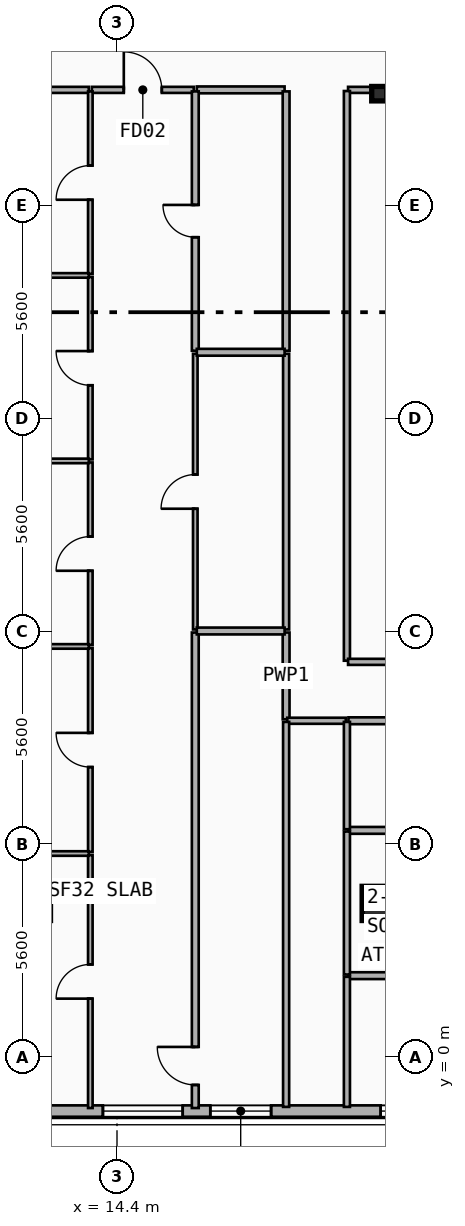
"""IFC4 building model, lengths in metres.
Left out: names, types, materials, properties, quantities, classifications, styles, units other than length and angle.
Written with IfcOpenShell. Run it as: python <this file> out.ifc"""

import sys

from ifc_helpers import new_model, si_unit, direction, frame, frame_2d, origin, origin_2d, place, context, subcontext, project, spatial, rectangle, i_section, extrude, element, fill, save


model = new_model("IFC4")
c1 = context("Model", 3, precision=1e-05, world=origin(), true_north=direction((0.0, 1.0)))
c2 = subcontext(c1, "Body", "Model", "MODEL_VIEW")
j1 = project(units=[si_unit("LENGTHUNIT", "METRE"), si_unit("PLANEANGLEUNIT", "RADIAN")], contexts=[c1])
p1 = place(None, origin())
s1 = spatial("IfcSite", under=j1, at=p1, CompositionType="ELEMENT")
p2 = place(p1, origin())
s2 = spatial("IfcBuilding", under=s1, at=p2, CompositionType="ELEMENT")
p3 = place(p2, frame((0.0, 0.0, 243.6)))
s3 = spatial("IfcBuildingStorey", under=s2, at=p3, CompositionType="ELEMENT", Elevation=243.6)
p4 = place(p3, frame((21.3, 25.35, 0.0), z_axis=(0.0, 0.0, 1.0), x_axis=(1.0, 0.0, 0.0)))
e1 = element("IfcColumn", 1, at=p4, inside=s3, PredefinedType="COLUMN", context=c2, shape_type="SweptSolid", body=[
    extrude(i_section(OverallWidth=0.395, OverallDepth=0.38, WebThickness=0.019, FlangeThickness=0.03, FilletRadius=0.015, at=origin_2d()), origin(), (0.0, 0.0, 1.0), 3.7),
])
p5 = place(p3, frame((21.3, 4.153, 0.0), z_axis=(0.0, -0.090227632116, 0.995921168769), x_axis=(1.0, 0.0, 0.0)))
e2 = element("IfcColumn", 2, at=p5, inside=s3, PredefinedType="COLUMN", context=c2, shape_type="SweptSolid", body=[
    extrude(rectangle(XDim=0.9, YDim=0.9, at=origin_2d()), origin(), (0.0, 0.0, 1.0), 3.715),
])
p6 = place(p3, frame((45.2, -1.42, 0.0), z_axis=(0.0, 0.0, 1.0), x_axis=(-1.0, 0.0, 0.0)))
e3 = element("IfcWall", 3, at=p6, inside=s3, PredefinedType="SOLIDWALL", context=c2, shape_type="SweptSolid", body=[
    extrude(rectangle(XDim=32.8, YDim=0.3, at=frame_2d((16.4, 0.0))), origin(), (0.0, 0.0, 1.0), 3.42),
])
p7 = place(p6, frame((29.071, 0.0, 0.75)))
e4 = element("IfcOpeningElement", 4, at=p7, cuts=e3, PredefinedType="OPENING", context=c2, shape_type="SweptSolid", body=[
    extrude(rectangle(XDim=2.1, YDim=2.1, at=frame_2d((1.05, 1.05))), frame((0.0, 0.16, 0.0), z_axis=(0.0, -1.0, 0.0), x_axis=(1.0, 0.0, 0.0)), (0.0, 0.0, 1.0), 0.32),
])
p8 = place(p6, frame((26.745, 0.0, 0.75)))
e5 = element("IfcOpeningElement", 5, at=p8, cuts=e3, PredefinedType="OPENING", context=c2, shape_type="SweptSolid", body=[
    extrude(rectangle(XDim=1.6, YDim=1.95, at=frame_2d((0.8, 0.975))), frame((0.0, 0.16, 0.0), z_axis=(0.0, -1.0, 0.0), x_axis=(1.0, 0.0, 0.0)), (0.0, 0.0, 1.0), 0.32),
])
p9 = place(p6, frame((18.105, 0.0, 0.75)))
e6 = element("IfcOpeningElement", 6, at=p9, cuts=e3, PredefinedType="OPENING", context=c2, shape_type="SweptSolid", body=[
    extrude(rectangle(XDim=2.1, YDim=2.1, at=frame_2d((1.05, 1.05))), frame((0.0, 0.16, 0.0), z_axis=(0.0, -1.0, 0.0), x_axis=(1.0, 0.0, 0.0)), (0.0, 0.0, 1.0), 0.32),
])
p10 = place(p6, frame((21.762, 0.0, 0.75)))
e7 = element("IfcOpeningElement", 7, at=p10, cuts=e3, PredefinedType="OPENING", context=c2, shape_type="SweptSolid", body=[
    extrude(rectangle(XDim=2.1, YDim=2.1, at=frame_2d((1.05, 1.05))), frame((0.0, 0.16, 0.0), z_axis=(0.0, -1.0, 0.0), x_axis=(1.0, 0.0, 0.0)), (0.0, 0.0, 1.0), 0.32),
])
p11 = place(p6, frame((11.364, 0.0, 0.75)))
e8 = element("IfcOpeningElement", 8, at=p11, cuts=e3, PredefinedType="OPENING", context=c2, shape_type="SweptSolid", body=[
    extrude(rectangle(XDim=2.1, YDim=2.1, at=frame_2d((1.05, 1.05))), frame((0.0, 0.16, 0.0), z_axis=(0.0, -1.0, 0.0), x_axis=(1.0, 0.0, 0.0)), (0.0, 0.0, 1.0), 0.32),
])
p12 = place(p6, frame((9.238, 0.0, 0.68)))
e9 = element("IfcOpeningElement", 9, at=p12, cuts=e3, PredefinedType="OPENING", context=c2, shape_type="SweptSolid", body=[
    extrude(rectangle(XDim=1.2, YDim=1.5, at=frame_2d((0.6, 0.75))), frame((0.0, 0.16, 0.0), z_axis=(0.0, -1.0, 0.0), x_axis=(1.0, 0.0, 0.0)), (0.0, 0.0, 1.0), 0.32),
])
p13 = place(p6, frame((14.669, 0.0, 0.75)))
e10 = element("IfcOpeningElement", 10, at=p13, cuts=e3, PredefinedType="OPENING", context=c2, shape_type="SweptSolid", body=[
    extrude(rectangle(XDim=2.1, YDim=2.1, at=frame_2d((1.05, 1.05))), frame((0.0, 0.16, 0.0), z_axis=(0.0, -1.0, 0.0), x_axis=(1.0, 0.0, 0.0)), (0.0, 0.0, 1.0), 0.32),
])
p14 = place(p6, frame((1.937, 0.0, 0.75)))
e11 = element("IfcOpeningElement", 11, at=p14, cuts=e3, PredefinedType="OPENING", context=c2, shape_type="SweptSolid", body=[
    extrude(rectangle(XDim=2.1, YDim=2.1, at=frame_2d((1.05, 1.05))), frame((0.0, 0.16, 0.0), z_axis=(0.0, -1.0, 0.0), x_axis=(1.0, 0.0, 0.0)), (0.0, 0.0, 1.0), 0.32),
])
p15 = place(p6, frame((4.709, 0.0, 0.8)))
e12 = element("IfcOpeningElement", 12, at=p15, cuts=e3, PredefinedType="OPENING", context=c2, shape_type="SweptSolid", body=[
    extrude(rectangle(XDim=1.8, YDim=1.8, at=frame_2d((0.9, 0.9))), frame((0.0, 0.16, 0.0), z_axis=(0.0, -1.0, 0.0), x_axis=(1.0, 0.0, 0.0)), (0.0, 0.0, 1.0), 0.32),
])
p16 = place(p3, frame((13.738, 25.45, 0.0), z_axis=(0.0, 0.0, 1.0), x_axis=(1.0, 0.0, 0.0)))
e13 = element("IfcWall", 13, at=p16, inside=s3, PredefinedType="PARTITIONING", context=c2, shape_type="SweptSolid", body=[
    extrude(rectangle(XDim=2.682, YDim=0.16, at=frame_2d((1.341, 0.0))), origin(), (0.0, 0.0, 1.0), 3.42),
])
p17 = place(p16, frame((0.841, 0.0, 0.0)))
e14 = element("IfcOpeningElement", 14, at=p17, cuts=e13, PredefinedType="OPENING", context=c2, shape_type="SweptSolid", body=[
    extrude(rectangle(XDim=1.0, YDim=2.15, at=frame_2d((0.5, 1.075))), frame((0.0, 0.09, 0.0), z_axis=(0.0, -1.0, 0.0), x_axis=(1.0, 0.0, 0.0)), (0.0, 0.0, 1.0), 0.18),
])
p18 = place(p3, frame((16.5, 25.45, 0.0), z_axis=(0.0, 0.0, 1.0), x_axis=(1.0, 0.0, 0.0)))
e15 = element("IfcWall", 15, at=p18, inside=s3, PredefinedType="PLUMBINGWALL", context=c2, shape_type="SweptSolid", body=[
    extrude(rectangle(XDim=2.31, YDim=0.18, at=frame_2d((1.155, 0.0))), origin(), (0.0, 0.0, 1.0), 3.42),
])
p19 = place(p3, frame((8.46, 25.45, 0.0), z_axis=(0.0, 0.0, 1.0), x_axis=(1.0, 0.0, 0.0)))
e16 = element("IfcWall", 16, at=p19, inside=s3, PredefinedType="PARTITIONING", context=c2, shape_type="SweptSolid", body=[
    extrude(rectangle(XDim=5.198, YDim=0.16, at=frame_2d((2.599, 0.0))), origin(), (0.0, 0.0, 1.0), 2.7),
])
p20 = place(p3, frame((18.85, 8.89, 0.0), z_axis=(0.0, 0.0, 1.0), x_axis=(0.0, 1.0, 0.0)))
e17 = element("IfcWall", 17, at=p20, inside=s3, PredefinedType="PLUMBINGWALL", context=c2, shape_type="SweptSolid", body=[
    extrude(rectangle(XDim=2.282, YDim=0.18, at=frame_2d((1.141, 0.0))), origin(), (0.0, 0.0, 1.0), 2.9),
])
p21 = place(p3, frame((18.85, 11.252, 0.0), z_axis=(0.0, 0.0, 1.0), x_axis=(0.0, 1.0, 0.0)))
e18 = element("IfcWall", 18, at=p21, inside=s3, PredefinedType="PARTITIONING", context=c2, shape_type="SweptSolid", body=[
    extrude(rectangle(XDim=7.254, YDim=0.16, at=frame_2d((3.627, 0.0))), origin(), (0.0, 0.0, 1.0), 2.9),
])
p22 = place(p3, frame((18.85, 18.586, 0.0), z_axis=(0.0, 0.0, 1.0), x_axis=(0.0, 1.0, 0.0)))
e19 = element("IfcWall", 19, at=p22, inside=s3, PredefinedType="PLUMBINGWALL", context=c2, shape_type="SweptSolid", body=[
    extrude(rectangle(XDim=6.824, YDim=0.18, at=frame_2d((3.412, 0.0))), origin(), (0.0, 0.0, 1.0), 2.9),
])
p23 = place(p3, frame((20.49, 8.85, 0.0), z_axis=(0.0, 0.0, 1.0), x_axis=(1.0, 0.0, 0.0)))
e20 = element("IfcWall", 20, at=p23, inside=s3, PredefinedType="PLUMBINGWALL", context=c2, shape_type="SweptSolid", body=[
    extrude(rectangle(XDim=3.796, YDim=0.18, at=frame_2d((1.898, 0.0))), origin(), (0.0, 0.0, 1.0), 2.7),
])
p24 = place(p3, frame((16.46, -1.34, 0.0), z_axis=(0.0, 0.0, 1.0), x_axis=(0.0, 1.0, 0.0)))
e21 = element("IfcWall", 21, at=p24, inside=s3, PredefinedType="PLUMBINGWALL", context=c2, shape_type="SweptSolid", body=[
    extrude(rectangle(XDim=12.512, YDim=0.18, at=frame_2d((6.256, 0.0))), origin(), (0.0, 0.0, 1.0), 2.9),
])
p25 = place(p24, frame((0.608, 0.0, 0.0)))
e22 = element("IfcOpeningElement", 22, at=p25, cuts=e21, PredefinedType="OPENING", context=c2, shape_type="SweptSolid", body=[
    extrude(rectangle(XDim=1.0, YDim=2.15, at=frame_2d((0.5, 1.075))), frame((0.0, 0.1, 0.0), z_axis=(0.0, -1.0, 0.0), x_axis=(1.0, 0.0, 0.0)), (0.0, 0.0, 1.0), 0.2),
])
p26 = place(p3, frame((16.46, 11.252, 0.0), z_axis=(0.0, 0.0, 1.0), x_axis=(0.0, 1.0, 0.0)))
e23 = element("IfcWall", 23, at=p26, inside=s3, PredefinedType="PARTITIONING", context=c2, shape_type="SweptSolid", body=[
    extrude(rectangle(XDim=7.254, YDim=0.12, at=frame_2d((3.627, 0.0))), origin(), (0.0, 0.0, 1.0), 2.9),
])
p27 = place(p26, frame((3.177, 0.0, 0.0)))
e24 = element("IfcOpeningElement", 24, at=p27, cuts=e23, PredefinedType="OPENING", context=c2, shape_type="SweptSolid", body=[
    extrude(rectangle(XDim=0.9, YDim=2.1, at=frame_2d((0.45, 1.05))), frame((0.0, 0.07, 0.0), z_axis=(0.0, -1.0, 0.0), x_axis=(1.0, 0.0, 0.0)), (0.0, 0.0, 1.0), 0.14),
])
p28 = place(p3, frame((16.46, 18.586, 0.0), z_axis=(0.0, 0.0, 1.0), x_axis=(0.0, 1.0, 0.0)))
e25 = element("IfcWall", 25, at=p28, inside=s3, PredefinedType="PLUMBINGWALL", context=c2, shape_type="SweptSolid", body=[
    extrude(rectangle(XDim=6.824, YDim=0.18, at=frame_2d((3.412, 0.0))), origin(), (0.0, 0.0, 1.0), 2.9),
])
p29 = place(p28, frame((2.987, 0.0, 0.0)))
e26 = element("IfcOpeningElement", 26, at=p29, cuts=e25, PredefinedType="OPENING", context=c2, shape_type="SweptSolid", body=[
    extrude(rectangle(XDim=0.85, YDim=2.1, at=frame_2d((0.425, 1.05))), frame((0.0, 0.1, 0.0), z_axis=(0.0, -1.0, 0.0), x_axis=(1.0, 0.0, 0.0)), (0.0, 0.0, 1.0), 0.2),
])
p30 = place(p3, frame((13.698, -1.34, 0.0), z_axis=(0.0, 0.0, 1.0), x_axis=(0.0, 1.0, 0.0)))
e27 = element("IfcWall", 27, at=p30, inside=s3, PredefinedType="PARTITIONING", context=c2, shape_type="SweptSolid", body=[
    extrude(rectangle(XDim=6.657, YDim=0.12, at=frame_2d((3.329, 0.0))), origin(), (0.0, 0.0, 1.0), 3.08),
])
p31 = place(p30, frame((2.878, 0.0, 0.0)))
e28 = element("IfcOpeningElement", 28, at=p31, cuts=e27, PredefinedType="OPENING", context=c2, shape_type="SweptSolid", body=[
    extrude(rectangle(XDim=0.9, YDim=2.1, at=frame_2d((0.45, 1.05))), frame((0.0, 0.07, 0.0), z_axis=(0.0, -1.0, 0.0), x_axis=(1.0, 0.0, 0.0)), (0.0, 0.0, 1.0), 0.14),
])
p32 = place(p3, frame((13.698, 5.397, 0.0), z_axis=(0.0, 0.0, 1.0), x_axis=(0.0, 1.0, 0.0)))
e29 = element("IfcWall", 29, at=p32, inside=s3, PredefinedType="PARTITIONING", context=c2, shape_type="SweptSolid", body=[
    extrude(rectangle(XDim=5.369, YDim=0.12, at=frame_2d((2.685, 0.0))), origin(), (0.0, 0.0, 1.0), 3.05),
])
p33 = place(p32, frame((2.235, 0.0, 0.0)))
e30 = element("IfcOpeningElement", 30, at=p33, cuts=e29, PredefinedType="OPENING", context=c2, shape_type="SweptSolid", body=[
    extrude(rectangle(XDim=0.9, YDim=2.1, at=frame_2d((0.45, 1.05))), frame((0.0, 0.07, 0.0), z_axis=(0.0, -1.0, 0.0), x_axis=(1.0, 0.0, 0.0)), (0.0, 0.0, 1.0), 0.14),
])
p34 = place(p3, frame((13.698, 10.846, 0.0), z_axis=(0.0, 0.0, 1.0), x_axis=(0.0, 1.0, 0.0)))
e31 = element("IfcWall", 31, at=p34, inside=s3, PredefinedType="PARTITIONING", context=c2, shape_type="SweptSolid", body=[
    extrude(rectangle(XDim=4.801, YDim=0.12, at=frame_2d((2.4, 0.0))), origin(), (0.0, 0.0, 1.0), 2.9),
])
p35 = place(p34, frame((1.95, 0.0, 0.0)))
e32 = element("IfcOpeningElement", 32, at=p35, cuts=e31, PredefinedType="OPENING", context=c2, shape_type="SweptSolid", body=[
    extrude(rectangle(XDim=0.9, YDim=2.1, at=frame_2d((0.45, 1.05))), frame((0.0, 0.07, 0.0), z_axis=(0.0, -1.0, 0.0), x_axis=(1.0, 0.0, 0.0)), (0.0, 0.0, 1.0), 0.14),
])
p36 = place(p3, frame((13.698, 15.727, 0.0), z_axis=(0.0, 0.0, 1.0), x_axis=(0.0, 1.0, 0.0)))
e33 = element("IfcWall", 33, at=p36, inside=s3, PredefinedType="PARTITIONING", context=c2, shape_type="SweptSolid", body=[
    extrude(rectangle(XDim=4.801, YDim=0.12, at=frame_2d((2.4, 0.0))), origin(), (0.0, 0.0, 1.0), 2.9),
])
p37 = place(p36, frame((1.95, 0.0, 0.0)))
e34 = element("IfcOpeningElement", 34, at=p37, cuts=e33, PredefinedType="OPENING", context=c2, shape_type="SweptSolid", body=[
    extrude(rectangle(XDim=0.9, YDim=2.1, at=frame_2d((0.45, 1.05))), frame((0.0, 0.07, 0.0), z_axis=(0.0, -1.0, 0.0), x_axis=(1.0, 0.0, 0.0)), (0.0, 0.0, 1.0), 0.14),
])
p38 = place(p3, frame((13.698, 20.608, 0.0), z_axis=(0.0, 0.0, 1.0), x_axis=(0.0, 1.0, 0.0)))
e35 = element("IfcWall", 35, at=p38, inside=s3, PredefinedType="PARTITIONING", context=c2, shape_type="SweptSolid", body=[
    extrude(rectangle(XDim=4.802, YDim=0.12, at=frame_2d((2.401, 0.0))), origin(), (0.0, 0.0, 1.0), 3.05),
])
p39 = place(p38, frame((1.951, 0.0, 0.0)))
e36 = element("IfcOpeningElement", 36, at=p39, cuts=e35, PredefinedType="OPENING", context=c2, shape_type="SweptSolid", body=[
    extrude(rectangle(XDim=0.9, YDim=2.1, at=frame_2d((0.45, 1.05))), frame((0.0, 0.07, 0.0), z_axis=(0.0, -1.0, 0.0), x_axis=(1.0, 0.0, 0.0)), (0.0, 0.0, 1.0), 0.14),
])
p40 = place(p3, frame((16.5, 11.212, 0.0), z_axis=(0.0, 0.0, 1.0), x_axis=(1.0, 0.0, 0.0)))
e37 = element("IfcWall", 37, at=p40, inside=s3, PredefinedType="PLUMBINGWALL", context=c2, shape_type="SweptSolid", body=[
    extrude(rectangle(XDim=2.31, YDim=0.18, at=frame_2d((1.155, 0.0))), origin(), (0.0, 0.0, 1.0), 2.9),
])
p41 = place(p3, frame((16.5, 18.546, 0.0), z_axis=(0.0, 0.0, 1.0), x_axis=(1.0, 0.0, 0.0)))
e38 = element("IfcWall", 38, at=p41, inside=s3, PredefinedType="PLUMBINGWALL", context=c2, shape_type="SweptSolid", body=[
    extrude(rectangle(XDim=2.31, YDim=0.18, at=frame_2d((1.155, 0.0))), origin(), (0.0, 0.0, 1.0), 3.42),
])
for number, where, z_axis, x_axis in (
    (39, (8.46, 5.357, 0.0), (0.0, 0.0, 1.0), (1.0, 0.0, 0.0)),
    (40, (8.46, 10.806, 0.0), (0.0, 0.0, 1.0), (1.0, 0.0, 0.0)),
    (41, (8.46, 15.687, 0.0), (0.0, 0.0, 1.0), (1.0, 0.0, 0.0)),
    (42, (8.46, 20.568, 0.0), (0.0, 0.0, 1.0), (1.0, 0.0, 0.0)),
):
    element("IfcWall", number, at=place(p3, frame(where, z_axis=z_axis, x_axis=x_axis)), inside=s3, PredefinedType="PARTITIONING", context=c2, shape_type="SweptSolid", body=[
        extrude(rectangle(XDim=5.198, YDim=0.12, at=frame_2d((2.599, 0.0))), origin(), (0.0, 0.0, 1.0), 2.7),
    ])
p42 = place(p3, frame((20.49, 2.143, 0.0), z_axis=(0.0, 0.0, 1.0), x_axis=(1.0, 0.0, 0.0)))
e43 = element("IfcWall", 43, at=p42, inside=s3, PredefinedType="PLUMBINGWALL", context=c2, shape_type="SweptSolid", body=[
    extrude(rectangle(XDim=3.796, YDim=0.18, at=frame_2d((1.898, 0.0))), origin(), (0.0, 0.0, 1.0), 3.42),
])
p43 = place(p3, frame((20.49, 5.966, 0.0), z_axis=(0.0, 0.0, 1.0), x_axis=(1.0, 0.0, 0.0)))
e44 = element("IfcWall", 44, at=p43, inside=s3, PredefinedType="PLUMBINGWALL", context=c2, shape_type="SweptSolid", body=[
    extrude(rectangle(XDim=3.796, YDim=0.18, at=frame_2d((1.898, 0.0))), origin(), (0.0, 0.0, 1.0), 2.7),
])
p44 = place(p3, frame((20.48, 25.45, 0.0), z_axis=(0.0, 0.0, 1.0), x_axis=(1.0, 0.0, 0.0)))
e45 = element("IfcWall", 45, at=p44, inside=s3, PredefinedType="PARTITIONING", context=c2, shape_type="SweptSolid", body=[
    extrude(rectangle(XDim=15.84, YDim=0.16, at=frame_2d((7.92, 0.0))), origin(), (0.0, 0.0, 1.0), 2.7),
])
p45 = place(p3, frame((18.88, 8.85, 0.0), z_axis=(0.0, 0.0, 1.0), x_axis=(1.0, 0.0, 0.0)))
e46 = element("IfcWall", 46, at=p45, inside=s3, PredefinedType="PARTITIONING", context=c2, shape_type="SweptSolid", body=[
    extrude(rectangle(XDim=1.54, YDim=0.16, at=frame_2d((0.77, 0.0))), origin(), (0.0, 0.0, 1.0), 3.42),
])
p46 = place(p3, frame((20.45, 10.43, 0.0), z_axis=(0.0, 0.0, 1.0), x_axis=(0.0, 1.0, 0.0)))
e47 = element("IfcWall", 47, at=p46, inside=s3, PredefinedType="PARTITIONING", context=c2, shape_type="SweptSolid", body=[
    extrude(rectangle(XDim=14.99, YDim=0.16, at=frame_2d((7.495, 0.0))), origin(), (0.0, 0.0, 1.0), 2.9),
])
p47 = place(p3, frame((20.48, 10.4, 0.0), z_axis=(0.0, 0.0, 1.0), x_axis=(1.0, 0.0, 0.0)))
e48 = element("IfcWall", 48, at=p47, inside=s3, PredefinedType="PARTITIONING", context=c2, shape_type="SweptSolid", body=[
    extrude(rectangle(XDim=2.64, YDim=0.16, at=frame_2d((1.32, 0.0))), origin(), (0.0, 0.0, 1.0), 2.7),
])
p48 = place(p3, frame((18.85, -1.31, 0.0), z_axis=(0.0, 0.0, 1.0), x_axis=(0.0, 1.0, 0.0)))
e49 = element("IfcWall", 49, at=p48, inside=s3, PredefinedType="PARTITIONING", context=c2, shape_type="SweptSolid", body=[
    extrude(rectangle(XDim=10.13, YDim=0.16, at=frame_2d((5.065, 0.0))), origin(), (0.0, 0.0, 1.0), 3.05),
])
p49 = place(p3, frame((20.45, -1.31, 0.0), z_axis=(0.0, 0.0, 1.0), x_axis=(0.0, 1.0, 0.0)))
e50 = element("IfcWall", 50, at=p49, inside=s3, PredefinedType="PARTITIONING", context=c2, shape_type="SweptSolid", body=[
    extrude(rectangle(XDim=3.423, YDim=0.16, at=frame_2d((1.711, 0.0))), origin(), (0.0, 0.0, 1.0), 3.42),
])
p50 = place(p3, frame((20.45, 2.173, 0.0), z_axis=(0.0, 0.0, 1.0), x_axis=(0.0, 1.0, 0.0)))
e51 = element("IfcWall", 51, at=p50, inside=s3, PredefinedType="PARTITIONING", context=c2, shape_type="SweptSolid", body=[
    extrude(rectangle(XDim=3.763, YDim=0.16, at=frame_2d((1.881, 0.0))), origin(), (0.0, 0.0, 1.0), 3.08),
])
p51 = place(p3, frame((20.45, 5.996, 0.0), z_axis=(0.0, 0.0, 1.0), x_axis=(0.0, 1.0, 0.0)))
e52 = element("IfcWall", 52, at=p51, inside=s3, PredefinedType="PARTITIONING", context=c2, shape_type="SweptSolid", body=[
    extrude(rectangle(XDim=2.824, YDim=0.16, at=frame_2d((1.412, 0.0))), origin(), (0.0, 0.0, 1.0), 3.05),
])
p52 = place(p7, origin())
e53 = element("IfcWindow", 53, at=p52, inside=s3, PartitioningType="SINGLE_PANEL", PredefinedType="WINDOW", context=c2, shape_type="SweptSolid", body=[
    extrude(rectangle(XDim=2.1, YDim=2.1, at=frame_2d((1.05, 1.05))), frame((0.0, 0.03, 0.0), z_axis=(0.0, -1.0, 0.0), x_axis=(1.0, 0.0, 0.0)), (0.0, 0.0, 1.0), 0.06),
])
fill(e4, e53)
p53 = place(p8, origin())
e54 = element("IfcWindow", 54, at=p53, inside=s3, PartitioningType="SINGLE_PANEL", PredefinedType="WINDOW", context=c2, shape_type="SweptSolid", body=[
    extrude(rectangle(XDim=1.6, YDim=1.95, at=frame_2d((0.8, 0.975))), frame((0.0, 0.03, 0.0), z_axis=(0.0, -1.0, 0.0), x_axis=(1.0, 0.0, 0.0)), (0.0, 0.0, 1.0), 0.06),
])
fill(e5, e54)
p54 = place(p10, origin())
e55 = element("IfcWindow", 55, at=p54, inside=s3, PartitioningType="SINGLE_PANEL", PredefinedType="WINDOW", context=c2, shape_type="SweptSolid", body=[
    extrude(rectangle(XDim=2.1, YDim=2.1, at=frame_2d((1.05, 1.05))), frame((0.0, 0.03, 0.0), z_axis=(0.0, -1.0, 0.0), x_axis=(1.0, 0.0, 0.0)), (0.0, 0.0, 1.0), 0.06),
])
fill(e7, e55)
p55 = place(p17, origin())
e56 = element("IfcDoor", 56, at=p55, inside=s3, OperationType="SINGLE_SWING_LEFT", PredefinedType="DOOR", context=c2, shape_type="SweptSolid", body=[
    extrude(rectangle(XDim=1.0, YDim=2.15, at=frame_2d((0.5, 1.075))), frame((0.0, 0.025, 0.0), z_axis=(0.0, -1.0, 0.0), x_axis=(1.0, 0.0, 0.0)), (0.0, 0.0, 1.0), 0.05),
])
fill(e14, e56)
p56 = place(p25, origin())
e57 = element("IfcDoor", 57, at=p56, inside=s3, OperationType="SINGLE_SWING_RIGHT", PredefinedType="DOOR", context=c2, shape_type="SweptSolid", body=[
    extrude(rectangle(XDim=1.0, YDim=2.15, at=frame_2d((0.5, 1.075))), frame((0.0, 0.025, 0.0), z_axis=(0.0, -1.0, 0.0), x_axis=(1.0, 0.0, 0.0)), (0.0, 0.0, 1.0), 0.05),
])
fill(e22, e57)
p57 = place(p27, origin())
e58 = element("IfcDoor", 58, at=p57, inside=s3, OperationType="SINGLE_SWING_LEFT", PredefinedType="DOOR", context=c2, shape_type="SweptSolid", body=[
    extrude(rectangle(XDim=0.9, YDim=2.1, at=frame_2d((0.45, 1.05))), frame((0.0, 0.025, 0.0), z_axis=(0.0, -1.0, 0.0), x_axis=(1.0, 0.0, 0.0)), (0.0, 0.0, 1.0), 0.05),
])
fill(e24, e58)
p58 = place(p29, origin())
e59 = element("IfcDoor", 59, at=p58, inside=s3, OperationType="SINGLE_SWING_RIGHT", PredefinedType="DOOR", context=c2, shape_type="SweptSolid", body=[
    extrude(rectangle(XDim=0.85, YDim=2.1, at=frame_2d((0.425, 1.05))), frame((0.0, 0.025, 0.0), z_axis=(0.0, -1.0, 0.0), x_axis=(1.0, 0.0, 0.0)), (0.0, 0.0, 1.0), 0.05),
])
fill(e26, e59)
p59 = place(p31, origin())
e60 = element("IfcDoor", 60, at=p59, inside=s3, OperationType="SINGLE_SWING_LEFT", PredefinedType="DOOR", context=c2, shape_type="SweptSolid", body=[
    extrude(rectangle(XDim=0.9, YDim=2.1, at=frame_2d((0.45, 1.05))), frame((0.0, 0.025, 0.0), z_axis=(0.0, -1.0, 0.0), x_axis=(1.0, 0.0, 0.0)), (0.0, 0.0, 1.0), 0.05),
])
fill(e28, e60)
p60 = place(p33, origin())
e61 = element("IfcDoor", 61, at=p60, inside=s3, OperationType="SINGLE_SWING_RIGHT", PredefinedType="DOOR", context=c2, shape_type="SweptSolid", body=[
    extrude(rectangle(XDim=0.9, YDim=2.1, at=frame_2d((0.45, 1.05))), frame((0.0, 0.025, 0.0), z_axis=(0.0, -1.0, 0.0), x_axis=(1.0, 0.0, 0.0)), (0.0, 0.0, 1.0), 0.05),
])
fill(e30, e61)
p61 = place(p35, origin())
e62 = element("IfcDoor", 62, at=p61, inside=s3, OperationType="SINGLE_SWING_LEFT", PredefinedType="DOOR", context=c2, shape_type="SweptSolid", body=[
    extrude(rectangle(XDim=0.9, YDim=2.1, at=frame_2d((0.45, 1.05))), frame((0.0, 0.025, 0.0), z_axis=(0.0, -1.0, 0.0), x_axis=(1.0, 0.0, 0.0)), (0.0, 0.0, 1.0), 0.05),
])
fill(e32, e62)
p62 = place(p37, origin())
e63 = element("IfcDoor", 63, at=p62, inside=s3, OperationType="SINGLE_SWING_RIGHT", PredefinedType="DOOR", context=c2, shape_type="SweptSolid", body=[
    extrude(rectangle(XDim=0.9, YDim=2.1, at=frame_2d((0.45, 1.05))), frame((0.0, 0.025, 0.0), z_axis=(0.0, -1.0, 0.0), x_axis=(1.0, 0.0, 0.0)), (0.0, 0.0, 1.0), 0.05),
])
fill(e34, e63)
p63 = place(p39, origin())
e64 = element("IfcDoor", 64, at=p63, inside=s3, OperationType="SINGLE_SWING_LEFT", PredefinedType="DOOR", context=c2, shape_type="SweptSolid", body=[
    extrude(rectangle(XDim=0.9, YDim=2.1, at=frame_2d((0.45, 1.05))), frame((0.0, 0.025, 0.0), z_axis=(0.0, -1.0, 0.0), x_axis=(1.0, 0.0, 0.0)), (0.0, 0.0, 1.0), 0.05),
])
fill(e36, e64)
save(model, sys.argv[1])
